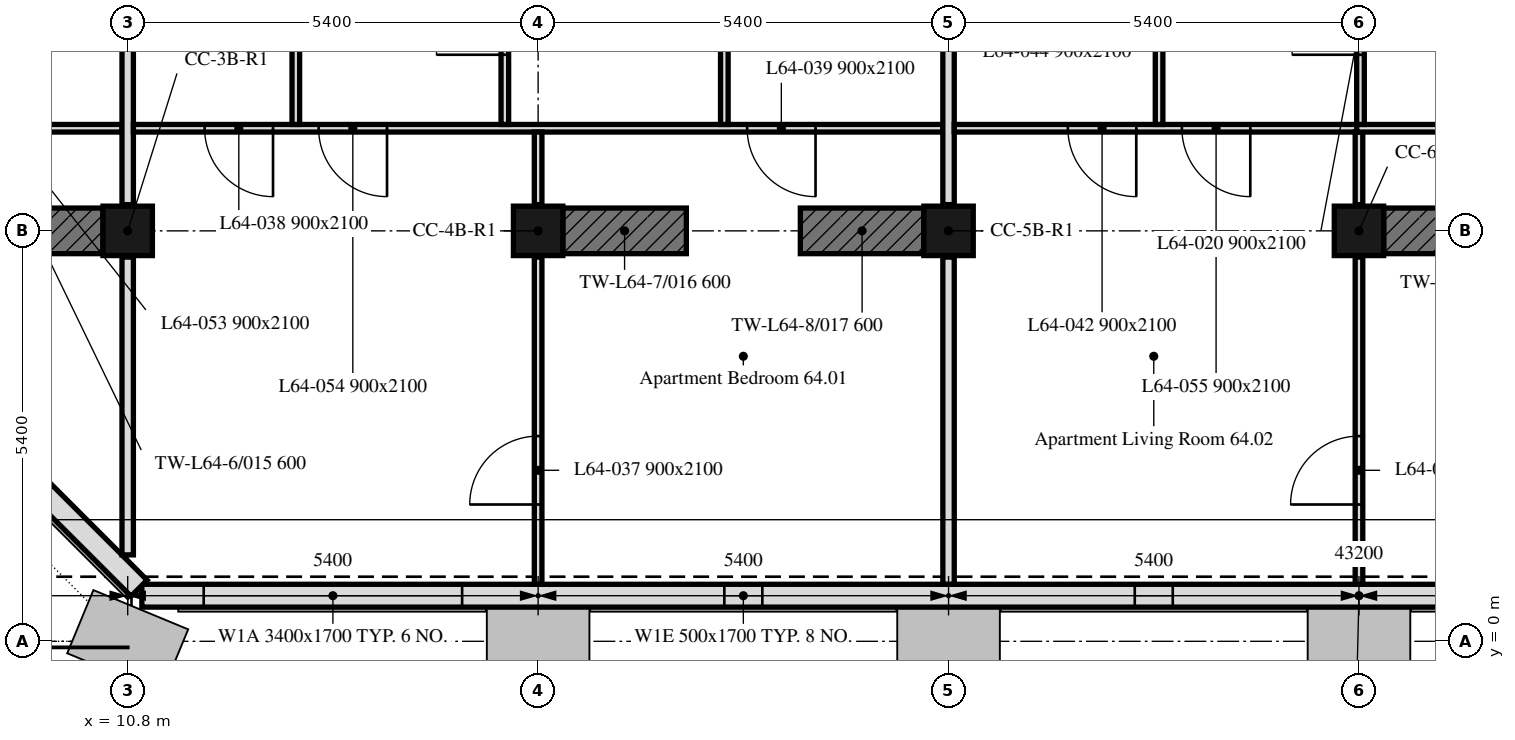
"""IFC4 building model, lengths in metres.
Left out: names, types, materials, properties, quantities, classifications, styles, units other than length and angle.
Written with IfcOpenShell. Run it as: python <this file> out.ifc"""

import sys

from ifc_helpers import new_model, si_unit, direction, frame, frame_2d, origin, origin_2d, place, context, subcontext, project, spatial, rectangle, extrude, element, fill, save


model = new_model("IFC4")
c1 = context("Model", 3, precision=1e-05, world=origin(), true_north=direction((0.0, 1.0)))
c2 = subcontext(c1, "Body", "Model", "MODEL_VIEW")
j1 = project(units=[si_unit("LENGTHUNIT", "METRE"), si_unit("PLANEANGLEUNIT", "RADIAN")], contexts=[c1])
p1 = place(None, origin())
s1 = spatial("IfcSite", under=j1, at=p1, CompositionType="ELEMENT")
p2 = place(p1, origin())
s2 = spatial("IfcBuilding", under=s1, at=p2, CompositionType="ELEMENT")
p3 = place(p2, frame((0.0, 0.0, 265.3)))
s3 = spatial("IfcBuildingStorey", under=s2, at=p3, CompositionType="ELEMENT", Elevation=265.3)
for number, where, z_axis, x_axis in (
    (1, (10.8, 5.4, 0.0), (0.0, 0.0, 1.0), (1.0, 0.0, 0.0)),
    (2, (16.2, 5.4, 0.0), (0.0, 0.0, 1.0), (1.0, 0.0, 0.0)),
    (3, (21.6, 5.4, 0.0), (0.0, 0.0, 1.0), (1.0, 0.0, 0.0)),
    (4, (27.0, 5.4, 0.0), (0.0, 0.0, 1.0), (1.0, 0.0, 0.0)),
):
    element("IfcColumn", number, at=place(p3, frame(where, z_axis=z_axis, x_axis=x_axis)), inside=s3, PredefinedType="COLUMN", context=c2, shape_type="SweptSolid", body=[
        extrude(rectangle(XDim=0.65, YDim=0.65, at=origin_2d()), origin(), (0.0, 0.0, 1.0), 3.0),
    ])
p4 = place(p3, frame((8.688, 5.4, 0.0), z_axis=(0.0, 0.0, 1.0), x_axis=(1.0, 0.0, 0.0)))
e5 = element("IfcWall", 5, at=p4, inside=s3, PredefinedType="SHEAR", context=c2, shape_type="SweptSolid", body=[
    extrude(rectangle(XDim=1.788, YDim=0.6, at=frame_2d((0.894, 0.0))), origin(), (0.0, 0.0, 1.0), 3.0),
])
for number, where, z_axis, x_axis in (
    (6, (16.525, 5.4, 0.0), (0.0, 0.0, 1.0), (1.0, 0.0, 0.0)),
    (7, (19.65, 5.4, 0.0), (0.0, 0.0, 1.0), (1.0, 0.0, 0.0)),
    (8, (27.325, 5.4, 0.0), (0.0, 0.0, 1.0), (1.0, 0.0, 0.0)),
):
    element("IfcWall", number, at=place(p3, frame(where, z_axis=z_axis, x_axis=x_axis)), inside=s3, PredefinedType="SHEAR", context=c2, shape_type="SweptSolid", body=[
        extrude(rectangle(XDim=1.625, YDim=0.6, at=frame_2d((0.812, 0.0))), origin(), (0.0, 0.0, 1.0), 3.0),
    ])
p5 = place(p3, frame((10.986, 0.6, 0.0), z_axis=(0.0, 0.0, 1.0), x_axis=(1.0, 0.0, 0.0)))
e9 = element("IfcWall", 9, at=p5, inside=s3, PredefinedType="SOLIDWALL", context=c2, shape_type="SweptSolid", body=[
    extrude(rectangle(XDim=32.027, YDim=0.3, at=frame_2d((16.014, 0.0))), origin(), (0.0, 0.0, 1.0), 3.0),
])
p6 = place(p5, frame((0.814, 0.0, 0.9)))
e10 = element("IfcOpeningElement", 10, at=p6, cuts=e9, PredefinedType="OPENING", context=c2, shape_type="SweptSolid", body=[
    extrude(rectangle(XDim=3.4, YDim=1.7, at=frame_2d((1.7, 0.85))), frame((0.0, 0.16, 0.0), z_axis=(0.0, -1.0, 0.0), x_axis=(1.0, 0.0, 0.0)), (0.0, 0.0, 1.0), 0.32),
])
p7 = place(p5, frame((7.664, 0.0, 0.9)))
e11 = element("IfcOpeningElement", 11, at=p7, cuts=e9, PredefinedType="OPENING", context=c2, shape_type="SweptSolid", body=[
    extrude(rectangle(XDim=0.5, YDim=1.7, at=frame_2d((0.25, 0.85))), frame((0.0, 0.16, 0.0), z_axis=(0.0, -1.0, 0.0), x_axis=(1.0, 0.0, 0.0)), (0.0, 0.0, 1.0), 0.32),
])
p8 = place(p5, frame((13.064, 0.0, 0.9)))
e12 = element("IfcOpeningElement", 12, at=p8, cuts=e9, PredefinedType="OPENING", context=c2, shape_type="SweptSolid", body=[
    extrude(rectangle(XDim=0.5, YDim=1.7, at=frame_2d((0.25, 0.85))), frame((0.0, 0.16, 0.0), z_axis=(0.0, -1.0, 0.0), x_axis=(1.0, 0.0, 0.0)), (0.0, 0.0, 1.0), 0.32),
])
p9 = place(p5, frame((18.464, 0.0, 0.9)))
e13 = element("IfcOpeningElement", 13, at=p9, cuts=e9, PredefinedType="OPENING", context=c2, shape_type="SweptSolid", body=[
    extrude(rectangle(XDim=0.5, YDim=1.7, at=frame_2d((0.25, 0.85))), frame((0.0, 0.16, 0.0), z_axis=(0.0, -1.0, 0.0), x_axis=(1.0, 0.0, 0.0)), (0.0, 0.0, 1.0), 0.32),
])
p10 = place(p5, frame((23.864, 0.0, 0.9)))
e14 = element("IfcOpeningElement", 14, at=p10, cuts=e9, PredefinedType="OPENING", context=c2, shape_type="SweptSolid", body=[
    extrude(rectangle(XDim=0.5, YDim=1.7, at=frame_2d((0.25, 0.85))), frame((0.0, 0.16, 0.0), z_axis=(0.0, -1.0, 0.0), x_axis=(1.0, 0.0, 0.0)), (0.0, 0.0, 1.0), 0.32),
])
p11 = place(p5, frame((28.164, 0.0, 0.9)))
e15 = element("IfcOpeningElement", 15, at=p11, cuts=e9, PredefinedType="OPENING", context=c2, shape_type="SweptSolid", body=[
    extrude(rectangle(XDim=1.1, YDim=1.7, at=frame_2d((0.55, 0.85))), frame((0.0, 0.16, 0.0), z_axis=(0.0, -1.0, 0.0), x_axis=(1.0, 0.0, 0.0)), (0.0, 0.0, 1.0), 0.32),
])
p12 = place(p3, frame((6.099, 5.55, 0.0), z_axis=(0.0, 0.0, 1.0), x_axis=(0.707106781187, -0.707106781187, 0.0)))
e16 = element("IfcWall", 16, at=p12, inside=s3, PredefinedType="SOLIDWALL", context=c2, shape_type="SweptSolid", body=[
    extrude(rectangle(XDim=6.86, YDim=0.3, at=frame_2d((3.43, 0.0))), origin(), (0.0, 0.0, 1.0), 3.0),
])
p13 = place(p12, frame((2.53, 0.0, 0.0)))
e17 = element("IfcOpeningElement", 17, at=p13, cuts=e16, PredefinedType="OPENING", context=c2, shape_type="SweptSolid", body=[
    extrude(rectangle(XDim=1.8, YDim=2.4, at=frame_2d((0.9, 1.2))), frame((0.0, 0.16, 0.0), z_axis=(0.0, -1.0, 0.0), x_axis=(1.0, 0.0, 0.0)), (0.0, 0.0, 1.0), 0.32),
])
p14 = place(p3, frame((10.725, 6.75, 0.0), z_axis=(0.0, 0.0, 1.0), x_axis=(-1.0, 0.0, 0.0)))
e18 = element("IfcWall", 18, at=p14, inside=s3, PredefinedType="PARTITIONING", context=c2, shape_type="SweptSolid", body=[
    extrude(rectangle(XDim=4.574, YDim=0.1, at=frame_2d((2.287, 0.0))), origin(), (0.0, 0.0, 1.0), 3.0),
])
p15 = place(p14, frame((2.625, 0.0, 0.0)))
e19 = element("IfcOpeningElement", 19, at=p15, cuts=e18, PredefinedType="OPENING", context=c2, shape_type="SweptSolid", body=[
    extrude(rectangle(XDim=0.9, YDim=2.1, at=frame_2d((0.45, 1.05))), frame((0.0, 0.05, 0.0), z_axis=(0.0, -1.0, 0.0), x_axis=(1.0, 0.0, 0.0)), (0.0, 0.0, 1.0), 0.1),
])
p16 = place(p14, frame((1.125, 0.0, 0.0)))
e20 = element("IfcOpeningElement", 20, at=p16, cuts=e18, PredefinedType="OPENING", context=c2, shape_type="SweptSolid", body=[
    extrude(rectangle(XDim=0.9, YDim=2.1, at=frame_2d((0.45, 1.05))), frame((0.0, 0.05, 0.0), z_axis=(0.0, -1.0, 0.0), x_axis=(1.0, 0.0, 0.0)), (0.0, 0.0, 1.0), 0.1),
])
p17 = place(p3, frame((10.8, 1.137, 0.0), z_axis=(0.0, 0.0, 1.0), x_axis=(0.0, 1.0, 0.0)))
e21 = element("IfcWall", 21, at=p17, inside=s3, PredefinedType="PARTITIONING", context=c2, shape_type="SweptSolid", body=[
    extrude(rectangle(XDim=3.918, YDim=0.15, at=frame_2d((1.959, 0.0))), origin(), (0.0, 0.0, 1.0), 3.0),
])
p18 = place(p3, frame((10.8, 5.745, 0.0), z_axis=(0.0, 0.0, 1.0), x_axis=(0.0, 1.0, 0.0)))
e22 = element("IfcWall", 22, at=p18, inside=s3, PredefinedType="PARTITIONING", context=c2, shape_type="SweptSolid", body=[
    extrude(rectangle(XDim=4.71, YDim=0.15, at=frame_2d((2.355, 0.0))), origin(), (0.0, 0.0, 1.0), 3.0),
])
p19 = place(p3, frame((21.525, 6.75, 0.0), z_axis=(0.0, 0.0, 1.0), x_axis=(-1.0, 0.0, 0.0)))
e23 = element("IfcWall", 23, at=p19, inside=s3, PredefinedType="PARTITIONING", context=c2, shape_type="SweptSolid", body=[
    extrude(rectangle(XDim=10.65, YDim=0.1, at=frame_2d((5.325, 0.0))), origin(), (0.0, 0.0, 1.0), 2.4),
])
p20 = place(p19, frame((8.813, 0.0, 0.0)))
e24 = element("IfcOpeningElement", 24, at=p20, cuts=e23, PredefinedType="OPENING", context=c2, shape_type="SweptSolid", body=[
    extrude(rectangle(XDim=0.9, YDim=2.1, at=frame_2d((0.45, 1.05))), frame((0.0, 0.05, 0.0), z_axis=(0.0, -1.0, 0.0), x_axis=(1.0, 0.0, 0.0)), (0.0, 0.0, 1.0), 0.1),
])
p21 = place(p19, frame((1.675, 0.0, 0.0)))
e25 = element("IfcOpeningElement", 25, at=p21, cuts=e23, PredefinedType="OPENING", context=c2, shape_type="SweptSolid", body=[
    extrude(rectangle(XDim=0.9, YDim=2.1, at=frame_2d((0.45, 1.05))), frame((0.0, 0.05, 0.0), z_axis=(0.0, -1.0, 0.0), x_axis=(1.0, 0.0, 0.0)), (0.0, 0.0, 1.0), 0.1),
])
p22 = place(p19, frame((7.313, 0.0, 0.0)))
e26 = element("IfcOpeningElement", 26, at=p22, cuts=e23, PredefinedType="OPENING", context=c2, shape_type="SweptSolid", body=[
    extrude(rectangle(XDim=0.9, YDim=2.1, at=frame_2d((0.45, 1.05))), frame((0.0, 0.05, 0.0), z_axis=(0.0, -1.0, 0.0), x_axis=(1.0, 0.0, 0.0)), (0.0, 0.0, 1.0), 0.1),
])
p23 = place(p3, frame((16.2, 0.751, 0.0), z_axis=(0.0, 0.0, 1.0), x_axis=(0.0, 1.0, 0.0)))
e27 = element("IfcWall", 27, at=p23, inside=s3, PredefinedType="PARTITIONING", context=c2, shape_type="SweptSolid", body=[
    extrude(rectangle(XDim=4.304, YDim=0.1, at=frame_2d((2.152, 0.0))), origin(), (0.0, 0.0, 1.0), 2.4),
])
p24 = place(p23, frame((1.049, 0.0, 0.0)))
e28 = element("IfcOpeningElement", 28, at=p24, cuts=e27, PredefinedType="OPENING", context=c2, shape_type="SweptSolid", body=[
    extrude(rectangle(XDim=0.9, YDim=2.1, at=frame_2d((0.45, 1.05))), frame((0.0, 0.05, 0.0), z_axis=(0.0, -1.0, 0.0), x_axis=(1.0, 0.0, 0.0)), (0.0, 0.0, 1.0), 0.1),
])
p25 = place(p3, frame((16.2, 5.745, 0.0), z_axis=(0.0, 0.0, 1.0), x_axis=(0.0, 1.0, 0.0)))
e29 = element("IfcWall", 29, at=p25, inside=s3, PredefinedType="PARTITIONING", context=c2, shape_type="SweptSolid", body=[
    extrude(rectangle(XDim=0.955, YDim=0.1, at=frame_2d((0.478, 0.0))), origin(), (0.0, 0.0, 1.0), 2.4),
])
p26 = place(p3, frame((21.6, 0.751, 0.0), z_axis=(0.0, 0.0, 1.0), x_axis=(0.0, 1.0, 0.0)))
e30 = element("IfcWall", 30, at=p26, inside=s3, PredefinedType="PARTITIONING", context=c2, shape_type="SweptSolid", body=[
    extrude(rectangle(XDim=4.304, YDim=0.15, at=frame_2d((2.152, 0.0))), origin(), (0.0, 0.0, 1.0), 2.4),
])
p27 = place(p3, frame((13.012, 6.8, 0.0), z_axis=(0.0, 0.0, 1.0), x_axis=(0.0, 1.0, 0.0)))
e31 = element("IfcWall", 31, at=p27, inside=s3, PredefinedType="PARTITIONING", context=c2, shape_type="SweptSolid", body=[
    extrude(rectangle(XDim=7.075, YDim=0.1, at=frame_2d((3.538, 0.0))), origin(), (0.0, 0.0, 1.0), 3.0),
])
p28 = place(p27, frame((5.617, 0.0, 0.0)))
e32 = element("IfcOpeningElement", 32, at=p28, cuts=e31, PredefinedType="OPENING", context=c2, shape_type="SweptSolid", body=[
    extrude(rectangle(XDim=0.9, YDim=2.1, at=frame_2d((0.45, 1.05))), frame((0.0, 0.05, 0.0), z_axis=(0.0, -1.0, 0.0), x_axis=(1.0, 0.0, 0.0)), (0.0, 0.0, 1.0), 0.1),
])
p29 = place(p27, frame((1.45, 0.0, 0.0)))
e33 = element("IfcOpeningElement", 33, at=p29, cuts=e31, PredefinedType="OPENING", context=c2, shape_type="SweptSolid", body=[
    extrude(rectangle(XDim=0.9, YDim=2.1, at=frame_2d((0.45, 1.05))), frame((0.0, 0.05, 0.0), z_axis=(0.0, -1.0, 0.0), x_axis=(1.0, 0.0, 0.0)), (0.0, 0.0, 1.0), 0.1),
])
p30 = place(p3, frame((15.762, 6.8, 0.0), z_axis=(0.0, 0.0, 1.0), x_axis=(0.0, 1.0, 0.0)))
e34 = element("IfcWall", 34, at=p30, inside=s3, PredefinedType="PARTITIONING", context=c2, shape_type="SweptSolid", body=[
    extrude(rectangle(XDim=7.075, YDim=0.1, at=frame_2d((3.538, 0.0))), origin(), (0.0, 0.0, 1.0), 3.0),
])
p31 = place(p30, frame((0.917, 0.0, 0.0)))
e35 = element("IfcOpeningElement", 35, at=p31, cuts=e34, PredefinedType="OPENING", context=c2, shape_type="SweptSolid", body=[
    extrude(rectangle(XDim=0.9, YDim=2.1, at=frame_2d((0.45, 1.05))), frame((0.0, 0.05, 0.0), z_axis=(0.0, -1.0, 0.0), x_axis=(1.0, 0.0, 0.0)), (0.0, 0.0, 1.0), 0.1),
])
p32 = place(p30, frame((5.925, 0.0, 0.0)))
e36 = element("IfcOpeningElement", 36, at=p32, cuts=e34, PredefinedType="OPENING", context=c2, shape_type="SweptSolid", body=[
    extrude(rectangle(XDim=0.9, YDim=2.1, at=frame_2d((0.45, 1.05))), frame((0.0, 0.05, 0.0), z_axis=(0.0, -1.0, 0.0), x_axis=(1.0, 0.0, 0.0)), (0.0, 0.0, 1.0), 0.1),
])
p33 = place(p3, frame((18.65, 6.8, 0.0), z_axis=(0.0, 0.0, 1.0), x_axis=(0.0, 1.0, 0.0)))
e37 = element("IfcWall", 37, at=p33, inside=s3, PredefinedType="PARTITIONING", context=c2, shape_type="SweptSolid", body=[
    extrude(rectangle(XDim=4.6, YDim=0.1, at=frame_2d((2.3, 0.0))), origin(), (0.0, 0.0, 1.0), 3.0),
])
p34 = place(p3, frame((21.6, 5.745, 0.0), z_axis=(0.0, 0.0, 1.0), x_axis=(0.0, 1.0, 0.0)))
e38 = element("IfcWall", 38, at=p34, inside=s3, PredefinedType="PARTITIONING", context=c2, shape_type="SweptSolid", body=[
    extrude(rectangle(XDim=4.71, YDim=0.15, at=frame_2d((2.355, 0.0))), origin(), (0.0, 0.0, 1.0), 2.4),
])
p35 = place(p3, frame((27.05, 6.75, 0.0), z_axis=(0.0, 0.0, 1.0), x_axis=(-1.0, 0.0, 0.0)))
e39 = element("IfcWall", 39, at=p35, inside=s3, PredefinedType="PARTITIONING", context=c2, shape_type="SweptSolid", body=[
    extrude(rectangle(XDim=5.375, YDim=0.1, at=frame_2d((2.688, 0.0))), origin(), (0.0, 0.0, 1.0), 3.0),
])
p36 = place(p35, frame((2.98, 0.0, 0.0)))
e40 = element("IfcOpeningElement", 40, at=p36, cuts=e39, PredefinedType="OPENING", context=c2, shape_type="SweptSolid", body=[
    extrude(rectangle(XDim=0.9, YDim=2.1, at=frame_2d((0.45, 1.05))), frame((0.0, 0.05, 0.0), z_axis=(0.0, -1.0, 0.0), x_axis=(1.0, 0.0, 0.0)), (0.0, 0.0, 1.0), 0.1),
])
p37 = place(p35, frame((1.48, 0.0, 0.0)))
e41 = element("IfcOpeningElement", 41, at=p37, cuts=e39, PredefinedType="OPENING", context=c2, shape_type="SweptSolid", body=[
    extrude(rectangle(XDim=0.9, YDim=2.1, at=frame_2d((0.45, 1.05))), frame((0.0, 0.05, 0.0), z_axis=(0.0, -1.0, 0.0), x_axis=(1.0, 0.0, 0.0)), (0.0, 0.0, 1.0), 0.1),
])
p38 = place(p3, frame((27.0, 0.751, 0.0), z_axis=(0.0, 0.0, 1.0), x_axis=(0.0, 1.0, 0.0)))
e42 = element("IfcWall", 42, at=p38, inside=s3, PredefinedType="PARTITIONING", context=c2, shape_type="SweptSolid", body=[
    extrude(rectangle(XDim=4.304, YDim=0.1, at=frame_2d((2.152, 0.0))), origin(), (0.0, 0.0, 1.0), 2.4),
])
p39 = place(p38, frame((1.049, 0.0, 0.0)))
e43 = element("IfcOpeningElement", 43, at=p39, cuts=e42, PredefinedType="OPENING", context=c2, shape_type="SweptSolid", body=[
    extrude(rectangle(XDim=0.9, YDim=2.1, at=frame_2d((0.45, 1.05))), frame((0.0, 0.05, 0.0), z_axis=(0.0, -1.0, 0.0), x_axis=(1.0, 0.0, 0.0)), (0.0, 0.0, 1.0), 0.1),
])
p40 = place(p3, frame((27.0, 5.745, 0.0), z_axis=(0.0, 0.0, 1.0), x_axis=(0.0, 1.0, 0.0)))
e44 = element("IfcWall", 44, at=p40, inside=s3, PredefinedType="PARTITIONING", context=c2, shape_type="SweptSolid", body=[
    extrude(rectangle(XDim=0.955, YDim=0.1, at=frame_2d((0.478, 0.0))), origin(), (0.0, 0.0, 1.0), 2.4),
])
p41 = place(p3, frame((32.325, 6.75, 0.0), z_axis=(0.0, 0.0, 1.0), x_axis=(-1.0, 0.0, 0.0)))
e45 = element("IfcWall", 45, at=p41, inside=s3, PredefinedType="PARTITIONING", context=c2, shape_type="SweptSolid", body=[
    extrude(rectangle(XDim=5.355, YDim=0.1, at=frame_2d((2.677, 0.0))), origin(), (0.0, 0.0, 1.0), 3.0),
])
p42 = place(p41, frame((1.949, 0.0, 0.0)))
e46 = element("IfcOpeningElement", 46, at=p42, cuts=e45, PredefinedType="OPENING", context=c2, shape_type="SweptSolid", body=[
    extrude(rectangle(XDim=0.9, YDim=2.1, at=frame_2d((0.45, 1.05))), frame((0.0, 0.05, 0.0), z_axis=(0.0, -1.0, 0.0), x_axis=(1.0, 0.0, 0.0)), (0.0, 0.0, 1.0), 0.1),
])
p43 = place(p3, frame((24.37, 6.8, 0.0), z_axis=(0.0, 0.0, 1.0), x_axis=(0.0, 1.0, 0.0)))
e47 = element("IfcWall", 47, at=p43, inside=s3, PredefinedType="PARTITIONING", context=c2, shape_type="SweptSolid", body=[
    extrude(rectangle(XDim=7.075, YDim=0.1, at=frame_2d((3.538, 0.0))), origin(), (0.0, 0.0, 1.0), 3.0),
])
p44 = place(p43, frame((5.45, 0.0, 0.0)))
e48 = element("IfcOpeningElement", 48, at=p44, cuts=e47, PredefinedType="OPENING", context=c2, shape_type="SweptSolid", body=[
    extrude(rectangle(XDim=0.9, YDim=2.1, at=frame_2d((0.45, 1.05))), frame((0.0, 0.05, 0.0), z_axis=(0.0, -1.0, 0.0), x_axis=(1.0, 0.0, 0.0)), (0.0, 0.0, 1.0), 0.1),
])
p45 = place(p43, frame((1.85, 0.0, 0.0)))
e49 = element("IfcOpeningElement", 49, at=p45, cuts=e47, PredefinedType="OPENING", context=c2, shape_type="SweptSolid", body=[
    extrude(rectangle(XDim=0.9, YDim=2.1, at=frame_2d((0.45, 1.05))), frame((0.0, 0.05, 0.0), z_axis=(0.0, -1.0, 0.0), x_axis=(1.0, 0.0, 0.0)), (0.0, 0.0, 1.0), 0.1),
])
p46 = place(p3, frame((27.02, 6.8, 0.0), z_axis=(0.0, 0.0, 1.0), x_axis=(0.0, 1.0, 0.0)))
e50 = element("IfcWall", 50, at=p46, inside=s3, PredefinedType="PARTITIONING", context=c2, shape_type="SweptSolid", body=[
    extrude(rectangle(XDim=3.655, YDim=0.1, at=frame_2d((1.828, 0.0))), origin(), (0.0, 0.0, 1.0), 2.4),
])
p47 = place(p46, frame((0.917, 0.0, 0.0)))
e51 = element("IfcOpeningElement", 51, at=p47, cuts=e50, PredefinedType="OPENING", context=c2, shape_type="SweptSolid", body=[
    extrude(rectangle(XDim=0.9, YDim=2.1, at=frame_2d((0.45, 1.05))), frame((0.0, 0.05, 0.0), z_axis=(0.0, -1.0, 0.0), x_axis=(1.0, 0.0, 0.0)), (0.0, 0.0, 1.0), 0.1),
])
p48 = place(p6, origin())
e52 = element("IfcWindow", 52, at=p48, inside=s3, PartitioningType="SINGLE_PANEL", PredefinedType="WINDOW", context=c2, shape_type="SweptSolid", body=[
    extrude(rectangle(XDim=3.4, YDim=1.7, at=frame_2d((1.7, 0.85))), frame((0.0, 0.03, 0.0), z_axis=(0.0, -1.0, 0.0), x_axis=(1.0, 0.0, 0.0)), (0.0, 0.0, 1.0), 0.06),
])
fill(e10, e52)
p49 = place(p7, origin())
e53 = element("IfcWindow", 53, at=p49, inside=s3, PartitioningType="SINGLE_PANEL", PredefinedType="WINDOW", context=c2, shape_type="SweptSolid", body=[
    extrude(rectangle(XDim=0.5, YDim=1.7, at=frame_2d((0.25, 0.85))), frame((0.0, 0.03, 0.0), z_axis=(0.0, -1.0, 0.0), x_axis=(1.0, 0.0, 0.0)), (0.0, 0.0, 1.0), 0.06),
])
fill(e11, e53)
p50 = place(p8, origin())
e54 = element("IfcWindow", 54, at=p50, inside=s3, PartitioningType="SINGLE_PANEL", PredefinedType="WINDOW", context=c2, shape_type="SweptSolid", body=[
    extrude(rectangle(XDim=0.5, YDim=1.7, at=frame_2d((0.25, 0.85))), frame((0.0, 0.03, 0.0), z_axis=(0.0, -1.0, 0.0), x_axis=(1.0, 0.0, 0.0)), (0.0, 0.0, 1.0), 0.06),
])
fill(e12, e54)
p51 = place(p31, origin())
e55 = element("IfcDoor", 55, at=p51, inside=s3, OperationType="SINGLE_SWING_RIGHT", PredefinedType="DOOR", context=c2, shape_type="SweptSolid", body=[
    extrude(rectangle(XDim=0.9, YDim=2.1, at=frame_2d((0.45, 1.05))), frame((0.0, 0.025, 0.0), z_axis=(0.0, -1.0, 0.0), x_axis=(1.0, 0.0, 0.0)), (0.0, 0.0, 1.0), 0.05),
])
fill(e35, e55)
p52 = place(p47, origin())
e56 = element("IfcDoor", 56, at=p52, inside=s3, OperationType="SINGLE_SWING_LEFT", PredefinedType="DOOR", context=c2, shape_type="SweptSolid", body=[
    extrude(rectangle(XDim=0.9, YDim=2.1, at=frame_2d((0.45, 1.05))), frame((0.0, 0.025, 0.0), z_axis=(0.0, -1.0, 0.0), x_axis=(1.0, 0.0, 0.0)), (0.0, 0.0, 1.0), 0.05),
])
fill(e51, e56)
p53 = place(p24, origin())
e57 = element("IfcDoor", 57, at=p53, inside=s3, OperationType="SINGLE_SWING_LEFT", PredefinedType="DOOR", context=c2, shape_type="SweptSolid", body=[
    extrude(rectangle(XDim=0.9, YDim=2.1, at=frame_2d((0.45, 1.05))), frame((0.0, 0.025, 0.0), z_axis=(0.0, -1.0, 0.0), x_axis=(1.0, 0.0, 0.0)), (0.0, 0.0, 1.0), 0.05),
])
fill(e28, e57)
p54 = place(p20, origin())
e58 = element("IfcDoor", 58, at=p54, inside=s3, OperationType="SINGLE_SWING_RIGHT", PredefinedType="DOOR", context=c2, shape_type="SweptSolid", body=[
    extrude(rectangle(XDim=0.9, YDim=2.1, at=frame_2d((0.45, 1.05))), frame((0.0, 0.025, 0.0), z_axis=(0.0, -1.0, 0.0), x_axis=(1.0, 0.0, 0.0)), (0.0, 0.0, 1.0), 0.05),
])
fill(e24, e58)
p55 = place(p21, origin())
e59 = element("IfcDoor", 59, at=p55, inside=s3, OperationType="SINGLE_SWING_LEFT", PredefinedType="DOOR", context=c2, shape_type="SweptSolid", body=[
    extrude(rectangle(XDim=0.9, YDim=2.1, at=frame_2d((0.45, 1.05))), frame((0.0, 0.025, 0.0), z_axis=(0.0, -1.0, 0.0), x_axis=(1.0, 0.0, 0.0)), (0.0, 0.0, 1.0), 0.05),
])
fill(e25, e59)
p56 = place(p39, origin())
e60 = element("IfcDoor", 60, at=p56, inside=s3, OperationType="SINGLE_SWING_RIGHT", PredefinedType="DOOR", context=c2, shape_type="SweptSolid", body=[
    extrude(rectangle(XDim=0.9, YDim=2.1, at=frame_2d((0.45, 1.05))), frame((0.0, 0.025, 0.0), z_axis=(0.0, -1.0, 0.0), x_axis=(1.0, 0.0, 0.0)), (0.0, 0.0, 1.0), 0.05),
])
fill(e43, e60)
p57 = place(p36, origin())
e61 = element("IfcDoor", 61, at=p57, inside=s3, OperationType="SINGLE_SWING_RIGHT", PredefinedType="DOOR", context=c2, shape_type="SweptSolid", body=[
    extrude(rectangle(XDim=0.9, YDim=2.1, at=frame_2d((0.45, 1.05))), frame((0.0, 0.025, 0.0), z_axis=(0.0, -1.0, 0.0), x_axis=(1.0, 0.0, 0.0)), (0.0, 0.0, 1.0), 0.05),
])
fill(e40, e61)
p58 = place(p22, origin())
e62 = element("IfcDoor", 62, at=p58, inside=s3, OperationType="SINGLE_SWING_LEFT", PredefinedType="DOOR", context=c2, shape_type="SweptSolid", body=[
    extrude(rectangle(XDim=0.9, YDim=2.1, at=frame_2d((0.45, 1.05))), frame((0.0, 0.025, 0.0), z_axis=(0.0, -1.0, 0.0), x_axis=(1.0, 0.0, 0.0)), (0.0, 0.0, 1.0), 0.05),
])
fill(e26, e62)
p59 = place(p37, origin())
e63 = element("IfcDoor", 63, at=p59, inside=s3, OperationType="SINGLE_SWING_LEFT", PredefinedType="DOOR", context=c2, shape_type="SweptSolid", body=[
    extrude(rectangle(XDim=0.9, YDim=2.1, at=frame_2d((0.45, 1.05))), frame((0.0, 0.025, 0.0), z_axis=(0.0, -1.0, 0.0), x_axis=(1.0, 0.0, 0.0)), (0.0, 0.0, 1.0), 0.05),
])
fill(e41, e63)
save(model, sys.argv[1])
